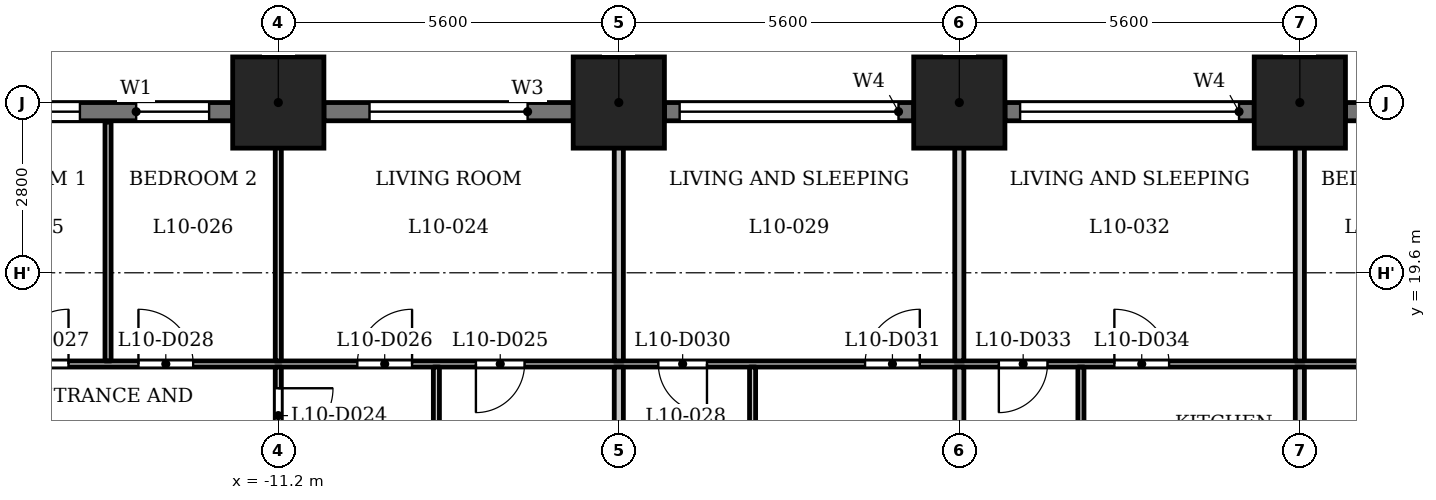
"""IFC4 building model, lengths in metres.
Left out: names, types, materials, properties, quantities, classifications, styles, units other than length and angle.
Written with IfcOpenShell. Run it as: python <this file> out.ifc"""

import sys

from ifc_helpers import new_model, si_unit, direction, frame, frame_2d, origin, origin_2d, place, context, subcontext, project, spatial, rectangle, extrude, element, fill, save


model = new_model("IFC4")
c1 = context("Model", 3, precision=1e-05, world=origin(), true_north=direction((0.0, 1.0)))
c2 = subcontext(c1, "Body", "Model", "MODEL_VIEW")
j1 = project(units=[si_unit("LENGTHUNIT", "METRE"), si_unit("PLANEANGLEUNIT", "RADIAN")], contexts=[c1])
p1 = place(None, origin())
s1 = spatial("IfcSite", under=j1, at=p1, CompositionType="ELEMENT")
p2 = place(p1, origin())
s2 = spatial("IfcBuilding", under=s1, at=p2, CompositionType="ELEMENT")
p3 = place(p2, frame((0.0, 0.0, 44.5)))
s3 = spatial("IfcBuildingStorey", under=s2, at=p3, CompositionType="ELEMENT", Elevation=44.5)
for number, where, z_axis, x_axis in (
    (1, (5.6, 22.4, 0.0), (0.0, 0.0, 1.0), (1.0, 0.0, 0.0)),
    (2, (0.0, 22.4, 0.0), (0.0, 0.0, 1.0), (1.0, 0.0, 0.0)),
    (3, (-5.6, 22.4, 0.0), (0.0, 0.0, 1.0), (1.0, 0.0, 0.0)),
    (4, (-11.2, 22.4, 0.0), (0.0, 0.0, 1.0), (1.0, 0.0, 0.0)),
):
    element("IfcColumn", number, at=place(p3, frame(where, z_axis=z_axis, x_axis=x_axis)), inside=s3, PredefinedType="COLUMN", context=c2, shape_type="SweptSolid", body=[
        extrude(rectangle(XDim=1.5, YDim=1.5, at=origin_2d()), origin(), (0.0, 0.0, 1.0), 3.5),
    ])
p4 = place(p3, frame((10.45, 22.25, 0.0), z_axis=(0.0, 0.0, 1.0), x_axis=(-1.0, 0.0, 0.0)))
e5 = element("IfcWall", 5, at=p4, inside=s3, PredefinedType="SOLIDWALL", context=c2, shape_type="SweptSolid", body=[
    extrude(rectangle(XDim=4.1, YDim=0.3, at=frame_2d((2.05, 0.0))), origin(), (0.0, 0.0, 1.0), 2.35),
])
p5 = place(p4, frame((0.387, 0.0, 0.6)))
e6 = element("IfcOpeningElement", 6, at=p5, cuts=e5, PredefinedType="OPENING", context=c2, shape_type="SweptSolid", body=[
    extrude(rectangle(XDim=1.2, YDim=1.55, at=frame_2d((0.6, 0.775))), frame((0.0, 0.16, 0.0), z_axis=(0.0, -1.0, 0.0), x_axis=(1.0, 0.0, 0.0)), (0.0, 0.0, 1.0), 0.32),
])
p6 = place(p4, frame((2.512, 0.0, 0.6)))
e7 = element("IfcOpeningElement", 7, at=p6, cuts=e5, PredefinedType="OPENING", context=c2, shape_type="SweptSolid", body=[
    extrude(rectangle(XDim=1.2, YDim=1.55, at=frame_2d((0.6, 0.775))), frame((0.0, 0.16, 0.0), z_axis=(0.0, -1.0, 0.0), x_axis=(1.0, 0.0, 0.0)), (0.0, 0.0, 1.0), 0.32),
])
p7 = place(p3, frame((4.85, 22.25, 0.0), z_axis=(0.0, 0.0, 1.0), x_axis=(-1.0, 0.0, 0.0)))
e8 = element("IfcWall", 8, at=p7, inside=s3, PredefinedType="SOLIDWALL", context=c2, shape_type="SweptSolid", body=[
    extrude(rectangle(XDim=4.1, YDim=0.3, at=frame_2d((2.05, 0.0))), origin(), (0.0, 0.0, 1.0), 2.35),
])
p8 = place(p7, frame((0.25, 0.0, 1.2)))
e9 = element("IfcOpeningElement", 9, at=p8, cuts=e8, PredefinedType="OPENING", context=c2, shape_type="SweptSolid", body=[
    extrude(rectangle(XDim=3.6, YDim=0.95, at=frame_2d((1.8, 0.475))), frame((0.0, 0.16, 0.0), z_axis=(0.0, -1.0, 0.0), x_axis=(1.0, 0.0, 0.0)), (0.0, 0.0, 1.0), 0.32),
])
p9 = place(p3, frame((-0.75, 22.25, 0.0), z_axis=(0.0, 0.0, 1.0), x_axis=(-1.0, 0.0, 0.0)))
e10 = element("IfcWall", 10, at=p9, inside=s3, PredefinedType="SOLIDWALL", context=c2, shape_type="SweptSolid", body=[
    extrude(rectangle(XDim=4.1, YDim=0.3, at=frame_2d((2.05, 0.0))), origin(), (0.0, 0.0, 1.0), 2.35),
])
p10 = place(p9, frame((0.25, 0.0, 1.2)))
e11 = element("IfcOpeningElement", 11, at=p10, cuts=e10, PredefinedType="OPENING", context=c2, shape_type="SweptSolid", body=[
    extrude(rectangle(XDim=3.6, YDim=0.95, at=frame_2d((1.8, 0.475))), frame((0.0, 0.16, 0.0), z_axis=(0.0, -1.0, 0.0), x_axis=(1.0, 0.0, 0.0)), (0.0, 0.0, 1.0), 0.32),
])
p11 = place(p3, frame((-6.35, 22.25, 0.0), z_axis=(0.0, 0.0, 1.0), x_axis=(-1.0, 0.0, 0.0)))
e12 = element("IfcWall", 12, at=p11, inside=s3, PredefinedType="SOLIDWALL", context=c2, shape_type="SweptSolid", body=[
    extrude(rectangle(XDim=4.1, YDim=0.3, at=frame_2d((2.05, 0.0))), origin(), (0.0, 0.0, 1.0), 2.35),
])
p12 = place(p11, frame((0.75, 0.0, 0.9)))
e13 = element("IfcOpeningElement", 13, at=p12, cuts=e12, PredefinedType="OPENING", context=c2, shape_type="SweptSolid", body=[
    extrude(rectangle(XDim=2.6, YDim=1.25, at=frame_2d((1.3, 0.625))), frame((0.0, 0.16, 0.0), z_axis=(0.0, -1.0, 0.0), x_axis=(1.0, 0.0, 0.0)), (0.0, 0.0, 1.0), 0.32),
])
p13 = place(p3, frame((-11.95, 22.25, 0.0), z_axis=(0.0, 0.0, 1.0), x_axis=(-1.0, 0.0, 0.0)))
e14 = element("IfcWall", 14, at=p13, inside=s3, PredefinedType="SOLIDWALL", context=c2, shape_type="SweptSolid", body=[
    extrude(rectangle(XDim=4.1, YDim=0.3, at=frame_2d((2.05, 0.0))), origin(), (0.0, 0.0, 1.0), 2.35),
])
p14 = place(p13, frame((0.387, 0.0, 0.6)))
e15 = element("IfcOpeningElement", 15, at=p14, cuts=e14, PredefinedType="OPENING", context=c2, shape_type="SweptSolid", body=[
    extrude(rectangle(XDim=1.2, YDim=1.55, at=frame_2d((0.6, 0.775))), frame((0.0, 0.16, 0.0), z_axis=(0.0, -1.0, 0.0), x_axis=(1.0, 0.0, 0.0)), (0.0, 0.0, 1.0), 0.32),
])
p15 = place(p13, frame((2.512, 0.0, 0.6)))
e16 = element("IfcOpeningElement", 16, at=p15, cuts=e14, PredefinedType="OPENING", context=c2, shape_type="SweptSolid", body=[
    extrude(rectangle(XDim=1.2, YDim=1.55, at=frame_2d((0.6, 0.775))), frame((0.0, 0.16, 0.0), z_axis=(0.0, -1.0, 0.0), x_axis=(1.0, 0.0, 0.0)), (0.0, 0.0, 1.0), 0.32),
])
p16 = place(p3, frame((-26.44, 18.1, 0.0), z_axis=(0.0, 0.0, 1.0), x_axis=(1.0, 0.0, 0.0)))
e17 = element("IfcWall", 17, at=p16, inside=s3, PredefinedType="PARTITIONING", context=c2, shape_type="SweptSolid", body=[
    extrude(rectangle(XDim=52.63, YDim=0.1, at=frame_2d((26.315, 0.0))), origin(), (0.0, 0.0, 1.0), 3.2),
])
p17 = place(p16, frame((2.626, 0.0, 0.0)))
e18 = element("IfcOpeningElement", 18, at=p17, cuts=e17, PredefinedType="OPENING", context=c2, shape_type="SweptSolid", body=[
    extrude(rectangle(XDim=0.8, YDim=2.1, at=frame_2d((0.4, 1.05))), frame((0.0, 0.06, 0.0), z_axis=(0.0, -1.0, 0.0), x_axis=(1.0, 0.0, 0.0)), (0.0, 0.0, 1.0), 0.12),
])
p18 = place(p16, frame((7.84, 0.0, 0.0)))
e19 = element("IfcOpeningElement", 19, at=p18, cuts=e17, PredefinedType="OPENING", context=c2, shape_type="SweptSolid", body=[
    extrude(rectangle(XDim=0.9, YDim=2.1, at=frame_2d((0.45, 1.05))), frame((0.0, 0.06, 0.0), z_axis=(0.0, -1.0, 0.0), x_axis=(1.0, 0.0, 0.0)), (0.0, 0.0, 1.0), 0.12),
])
p19 = place(p16, frame((18.49, 0.0, 0.0)))
e20 = element("IfcOpeningElement", 20, at=p19, cuts=e17, PredefinedType="OPENING", context=c2, shape_type="SweptSolid", body=[
    extrude(rectangle(XDim=0.8, YDim=2.1, at=frame_2d((0.4, 1.05))), frame((0.0, 0.06, 0.0), z_axis=(0.0, -1.0, 0.0), x_axis=(1.0, 0.0, 0.0)), (0.0, 0.0, 1.0), 0.12),
])
p20 = place(p16, frame((16.54, 0.0, 0.0)))
e21 = element("IfcOpeningElement", 21, at=p20, cuts=e17, PredefinedType="OPENING", context=c2, shape_type="SweptSolid", body=[
    extrude(rectangle(XDim=0.9, YDim=2.1, at=frame_2d((0.45, 1.05))), frame((0.0, 0.06, 0.0), z_axis=(0.0, -1.0, 0.0), x_axis=(1.0, 0.0, 0.0)), (0.0, 0.0, 1.0), 0.12),
])
p21 = place(p16, frame((10.89, 0.0, 0.0)))
e22 = element("IfcOpeningElement", 22, at=p21, cuts=e17, PredefinedType="OPENING", context=c2, shape_type="SweptSolid", body=[
    extrude(rectangle(XDim=0.9, YDim=2.1, at=frame_2d((0.45, 1.05))), frame((0.0, 0.06, 0.0), z_axis=(0.0, -1.0, 0.0), x_axis=(1.0, 0.0, 0.0)), (0.0, 0.0, 1.0), 0.12),
])
p22 = place(p16, frame((12.94, 0.0, 0.0)))
e23 = element("IfcOpeningElement", 23, at=p22, cuts=e17, PredefinedType="OPENING", context=c2, shape_type="SweptSolid", body=[
    extrude(rectangle(XDim=0.9, YDim=2.1, at=frame_2d((0.45, 1.05))), frame((0.0, 0.06, 0.0), z_axis=(0.0, -1.0, 0.0), x_axis=(1.0, 0.0, 0.0)), (0.0, 0.0, 1.0), 0.12),
])
p23 = place(p16, frame((21.49, 0.0, 0.0)))
e24 = element("IfcOpeningElement", 24, at=p23, cuts=e17, PredefinedType="OPENING", context=c2, shape_type="SweptSolid", body=[
    extrude(rectangle(XDim=0.8, YDim=2.1, at=frame_2d((0.4, 1.05))), frame((0.0, 0.06, 0.0), z_axis=(0.0, -1.0, 0.0), x_axis=(1.0, 0.0, 0.0)), (0.0, 0.0, 1.0), 0.12),
])
p24 = place(p16, frame((24.89, 0.0, 0.0)))
e25 = element("IfcOpeningElement", 25, at=p24, cuts=e17, PredefinedType="OPENING", context=c2, shape_type="SweptSolid", body=[
    extrude(rectangle(XDim=0.9, YDim=2.1, at=frame_2d((0.45, 1.05))), frame((0.0, 0.06, 0.0), z_axis=(0.0, -1.0, 0.0), x_axis=(1.0, 0.0, 0.0)), (0.0, 0.0, 1.0), 0.12),
])
p25 = place(p16, frame((27.09, 0.0, 0.0)))
e26 = element("IfcOpeningElement", 26, at=p25, cuts=e17, PredefinedType="OPENING", context=c2, shape_type="SweptSolid", body=[
    extrude(rectangle(XDim=0.8, YDim=2.1, at=frame_2d((0.4, 1.05))), frame((0.0, 0.06, 0.0), z_axis=(0.0, -1.0, 0.0), x_axis=(1.0, 0.0, 0.0)), (0.0, 0.0, 1.0), 0.12),
])
p26 = place(p16, frame((28.99, 0.0, 0.0)))
e27 = element("IfcOpeningElement", 27, at=p26, cuts=e17, PredefinedType="OPENING", context=c2, shape_type="SweptSolid", body=[
    extrude(rectangle(XDim=0.9, YDim=2.1, at=frame_2d((0.45, 1.05))), frame((0.0, 0.06, 0.0), z_axis=(0.0, -1.0, 0.0), x_axis=(1.0, 0.0, 0.0)), (0.0, 0.0, 1.0), 0.12),
])
p27 = place(p16, frame((41.69, 0.0, 0.0)))
e28 = element("IfcOpeningElement", 28, at=p27, cuts=e17, PredefinedType="OPENING", context=c2, shape_type="SweptSolid", body=[
    extrude(rectangle(XDim=0.8, YDim=2.1, at=frame_2d((0.4, 1.05))), frame((0.0, 0.06, 0.0), z_axis=(0.0, -1.0, 0.0), x_axis=(1.0, 0.0, 0.0)), (0.0, 0.0, 1.0), 0.12),
])
p28 = place(p16, frame((38.99, 0.0, 0.0)))
e29 = element("IfcOpeningElement", 29, at=p28, cuts=e17, PredefinedType="OPENING", context=c2, shape_type="SweptSolid", body=[
    extrude(rectangle(XDim=0.9, YDim=2.1, at=frame_2d((0.45, 1.05))), frame((0.0, 0.06, 0.0), z_axis=(0.0, -1.0, 0.0), x_axis=(1.0, 0.0, 0.0)), (0.0, 0.0, 1.0), 0.12),
])
p29 = place(p16, frame((33.29, 0.0, 0.0)))
e30 = element("IfcOpeningElement", 30, at=p29, cuts=e17, PredefinedType="OPENING", context=c2, shape_type="SweptSolid", body=[
    extrude(rectangle(XDim=0.9, YDim=2.1, at=frame_2d((0.45, 1.05))), frame((0.0, 0.06, 0.0), z_axis=(0.0, -1.0, 0.0), x_axis=(1.0, 0.0, 0.0)), (0.0, 0.0, 1.0), 0.12),
])
p30 = place(p16, frame((35.34, 0.0, 0.0)))
e31 = element("IfcOpeningElement", 31, at=p30, cuts=e17, PredefinedType="OPENING", context=c2, shape_type="SweptSolid", body=[
    extrude(rectangle(XDim=0.9, YDim=2.1, at=frame_2d((0.45, 1.05))), frame((0.0, 0.06, 0.0), z_axis=(0.0, -1.0, 0.0), x_axis=(1.0, 0.0, 0.0)), (0.0, 0.0, 1.0), 0.12),
])
p31 = place(p16, frame((50.74, 0.0, 0.0)))
e32 = element("IfcOpeningElement", 32, at=p31, cuts=e17, PredefinedType="OPENING", context=c2, shape_type="SweptSolid", body=[
    extrude(rectangle(XDim=0.8, YDim=2.1, at=frame_2d((0.4, 1.05))), frame((0.0, 0.06, 0.0), z_axis=(0.0, -1.0, 0.0), x_axis=(1.0, 0.0, 0.0)), (0.0, 0.0, 1.0), 0.12),
])
p32 = place(p16, frame((47.29, 0.0, 0.0)))
e33 = element("IfcOpeningElement", 33, at=p32, cuts=e17, PredefinedType="OPENING", context=c2, shape_type="SweptSolid", body=[
    extrude(rectangle(XDim=0.9, YDim=2.1, at=frame_2d((0.45, 1.05))), frame((0.0, 0.06, 0.0), z_axis=(0.0, -1.0, 0.0), x_axis=(1.0, 0.0, 0.0)), (0.0, 0.0, 1.0), 0.12),
])
p33 = place(p3, frame((-14.0, 18.15, 0.0), z_axis=(0.0, 0.0, 1.0), x_axis=(0.0, 1.0, 0.0)))
e34 = element("IfcWall", 34, at=p33, inside=s3, PredefinedType="PARTITIONING", context=c2, shape_type="SweptSolid", body=[
    extrude(rectangle(XDim=3.93, YDim=0.1, at=frame_2d((1.965, 0.0))), origin(), (0.0, 0.0, 1.0), 3.2),
])
p34 = place(p3, frame((-11.2, 15.475, 0.0), z_axis=(0.0, 0.0, 1.0), x_axis=(0.0, 1.0, 0.0)))
e35 = element("IfcWall", 35, at=p34, inside=s3, PredefinedType="PARTITIONING", context=c2, shape_type="SweptSolid", body=[
    extrude(rectangle(XDim=2.575, YDim=0.1, at=frame_2d((1.288, 0.0))), origin(), (0.0, 0.0, 1.0), 3.2),
])
p35 = place(p34, frame((1.326, 0.0, 0.0)))
e36 = element("IfcOpeningElement", 36, at=p35, cuts=e35, PredefinedType="OPENING", context=c2, shape_type="SweptSolid", body=[
    extrude(rectangle(XDim=0.9, YDim=2.1, at=frame_2d((0.45, 1.05))), frame((0.0, 0.06, 0.0), z_axis=(0.0, -1.0, 0.0), x_axis=(1.0, 0.0, 0.0)), (0.0, 0.0, 1.0), 0.12),
])
p36 = place(p3, frame((-11.2, 18.15, 0.0), z_axis=(0.0, 0.0, 1.0), x_axis=(0.0, 1.0, 0.0)))
e37 = element("IfcWall", 37, at=p36, inside=s3, PredefinedType="PARTITIONING", context=c2, shape_type="SweptSolid", body=[
    extrude(rectangle(XDim=4.98, YDim=0.1, at=frame_2d((2.49, 0.0))), origin(), (0.0, 0.0, 1.0), 3.2),
])
p37 = place(p3, frame((-8.6, 15.475, 0.0), z_axis=(0.0, 0.0, 1.0), x_axis=(0.0, 1.0, 0.0)))
e38 = element("IfcWall", 38, at=p37, inside=s3, PredefinedType="PARTITIONING", context=c2, shape_type="SweptSolid", body=[
    extrude(rectangle(XDim=2.575, YDim=0.1, at=frame_2d((1.288, 0.0))), origin(), (0.0, 0.0, 1.0), 3.2),
])
p38 = place(p3, frame((-5.6, 15.475, 0.0), z_axis=(0.0, 0.0, 1.0), x_axis=(0.0, 1.0, 0.0)))
e39 = element("IfcWall", 39, at=p38, inside=s3, PredefinedType="PARTITIONING", context=c2, shape_type="SweptSolid", body=[
    extrude(rectangle(XDim=2.575, YDim=0.15, at=frame_2d((1.288, 0.0))), origin(), (0.0, 0.0, 1.0), 3.2),
])
p39 = place(p3, frame((-5.6, 18.15, 0.0), z_axis=(0.0, 0.0, 1.0), x_axis=(0.0, 1.0, 0.0)))
e40 = element("IfcWall", 40, at=p39, inside=s3, PredefinedType="PARTITIONING", context=c2, shape_type="SweptSolid", body=[
    extrude(rectangle(XDim=4.98, YDim=0.15, at=frame_2d((2.49, 0.0))), origin(), (0.0, 0.0, 1.0), 3.2),
])
p40 = place(p3, frame((-3.4, 15.475, 0.0), z_axis=(0.0, 0.0, 1.0), x_axis=(0.0, 1.0, 0.0)))
e41 = element("IfcWall", 41, at=p40, inside=s3, PredefinedType="PARTITIONING", context=c2, shape_type="SweptSolid", body=[
    extrude(rectangle(XDim=2.575, YDim=0.1, at=frame_2d((1.288, 0.0))), origin(), (0.0, 0.0, 1.0), 3.2),
])
p41 = place(p3, frame((0.0, 15.475, 0.0), z_axis=(0.0, 0.0, 1.0), x_axis=(0.0, 1.0, 0.0)))
e42 = element("IfcWall", 42, at=p41, inside=s3, PredefinedType="PARTITIONING", context=c2, shape_type="SweptSolid", body=[
    extrude(rectangle(XDim=2.575, YDim=0.15, at=frame_2d((1.288, 0.0))), origin(), (0.0, 0.0, 1.0), 3.2),
])
p42 = place(p3, frame((0.0, 18.15, 0.0), z_axis=(0.0, 0.0, 1.0), x_axis=(0.0, 1.0, 0.0)))
e43 = element("IfcWall", 43, at=p42, inside=s3, PredefinedType="PARTITIONING", context=c2, shape_type="SweptSolid", body=[
    extrude(rectangle(XDim=4.98, YDim=0.15, at=frame_2d((2.49, 0.0))), origin(), (0.0, 0.0, 1.0), 3.2),
])
p43 = place(p3, frame((2.0, 15.475, 0.0), z_axis=(0.0, 0.0, 1.0), x_axis=(0.0, 1.0, 0.0)))
e44 = element("IfcWall", 44, at=p43, inside=s3, PredefinedType="PARTITIONING", context=c2, shape_type="SweptSolid", body=[
    extrude(rectangle(XDim=2.575, YDim=0.1, at=frame_2d((1.288, 0.0))), origin(), (0.0, 0.0, 1.0), 3.2),
])
p44 = place(p3, frame((5.6, 15.475, 0.0), z_axis=(0.0, 0.0, 1.0), x_axis=(0.0, 1.0, 0.0)))
e45 = element("IfcWall", 45, at=p44, inside=s3, PredefinedType="PARTITIONING", context=c2, shape_type="SweptSolid", body=[
    extrude(rectangle(XDim=2.575, YDim=0.15, at=frame_2d((1.288, 0.0))), origin(), (0.0, 0.0, 1.0), 3.2),
])
p45 = place(p3, frame((5.6, 18.15, 0.0), z_axis=(0.0, 0.0, 1.0), x_axis=(0.0, 1.0, 0.0)))
e46 = element("IfcWall", 46, at=p45, inside=s3, PredefinedType="PARTITIONING", context=c2, shape_type="SweptSolid", body=[
    extrude(rectangle(XDim=4.98, YDim=0.15, at=frame_2d((2.49, 0.0))), origin(), (0.0, 0.0, 1.0), 3.2),
])
p46 = place(p35, origin())
e47 = element("IfcDoor", 47, at=p46, inside=s3, OperationType="SINGLE_SWING_RIGHT", PredefinedType="DOOR", context=c2, shape_type="SweptSolid", body=[
    extrude(rectangle(XDim=0.9, YDim=2.1, at=frame_2d((0.45, 1.05))), frame((0.0, 0.025, 0.0), z_axis=(0.0, -1.0, 0.0), x_axis=(1.0, 0.0, 0.0)), (0.0, 0.0, 1.0), 0.05),
])
fill(e36, e47)
p47 = place(p19, origin())
e48 = element("IfcDoor", 48, at=p47, inside=s3, OperationType="SINGLE_SWING_LEFT", PredefinedType="DOOR", context=c2, shape_type="SweptSolid", body=[
    extrude(rectangle(XDim=0.8, YDim=2.1, at=frame_2d((0.4, 1.05))), frame((0.0, 0.025, 0.0), z_axis=(0.0, -1.0, 0.0), x_axis=(1.0, 0.0, 0.0)), (0.0, 0.0, 1.0), 0.05),
])
fill(e20, e48)
p48 = place(p20, origin())
e49 = element("IfcDoor", 49, at=p48, inside=s3, OperationType="SINGLE_SWING_LEFT", PredefinedType="DOOR", context=c2, shape_type="SweptSolid", body=[
    extrude(rectangle(XDim=0.9, YDim=2.1, at=frame_2d((0.45, 1.05))), frame((0.0, 0.025, 0.0), z_axis=(0.0, -1.0, 0.0), x_axis=(1.0, 0.0, 0.0)), (0.0, 0.0, 1.0), 0.05),
])
fill(e21, e49)
p49 = place(p21, origin())
e50 = element("IfcDoor", 50, at=p49, inside=s3, OperationType="SINGLE_SWING_LEFT", PredefinedType="DOOR", context=c2, shape_type="SweptSolid", body=[
    extrude(rectangle(XDim=0.9, YDim=2.1, at=frame_2d((0.45, 1.05))), frame((0.0, 0.025, 0.0), z_axis=(0.0, -1.0, 0.0), x_axis=(1.0, 0.0, 0.0)), (0.0, 0.0, 1.0), 0.05),
])
fill(e22, e50)
p50 = place(p22, origin())
e51 = element("IfcDoor", 51, at=p50, inside=s3, OperationType="SINGLE_SWING_RIGHT", PredefinedType="DOOR", context=c2, shape_type="SweptSolid", body=[
    extrude(rectangle(XDim=0.9, YDim=2.1, at=frame_2d((0.45, 1.05))), frame((0.0, 0.025, 0.0), z_axis=(0.0, -1.0, 0.0), x_axis=(1.0, 0.0, 0.0)), (0.0, 0.0, 1.0), 0.05),
])
fill(e23, e51)
p51 = place(p23, origin())
e52 = element("IfcDoor", 52, at=p51, inside=s3, OperationType="SINGLE_SWING_RIGHT", PredefinedType="DOOR", context=c2, shape_type="SweptSolid", body=[
    extrude(rectangle(XDim=0.8, YDim=2.1, at=frame_2d((0.4, 1.05))), frame((0.0, 0.025, 0.0), z_axis=(0.0, -1.0, 0.0), x_axis=(1.0, 0.0, 0.0)), (0.0, 0.0, 1.0), 0.05),
])
fill(e24, e52)
p52 = place(p24, origin())
e53 = element("IfcDoor", 53, at=p52, inside=s3, OperationType="SINGLE_SWING_LEFT", PredefinedType="DOOR", context=c2, shape_type="SweptSolid", body=[
    extrude(rectangle(XDim=0.9, YDim=2.1, at=frame_2d((0.45, 1.05))), frame((0.0, 0.025, 0.0), z_axis=(0.0, -1.0, 0.0), x_axis=(1.0, 0.0, 0.0)), (0.0, 0.0, 1.0), 0.05),
])
fill(e25, e53)
p53 = place(p25, origin())
e54 = element("IfcDoor", 54, at=p53, inside=s3, OperationType="SINGLE_SWING_LEFT", PredefinedType="DOOR", context=c2, shape_type="SweptSolid", body=[
    extrude(rectangle(XDim=0.8, YDim=2.1, at=frame_2d((0.4, 1.05))), frame((0.0, 0.025, 0.0), z_axis=(0.0, -1.0, 0.0), x_axis=(1.0, 0.0, 0.0)), (0.0, 0.0, 1.0), 0.05),
])
fill(e26, e54)
p54 = place(p26, origin())
e55 = element("IfcDoor", 55, at=p54, inside=s3, OperationType="SINGLE_SWING_RIGHT", PredefinedType="DOOR", context=c2, shape_type="SweptSolid", body=[
    extrude(rectangle(XDim=0.9, YDim=2.1, at=frame_2d((0.45, 1.05))), frame((0.0, 0.025, 0.0), z_axis=(0.0, -1.0, 0.0), x_axis=(1.0, 0.0, 0.0)), (0.0, 0.0, 1.0), 0.05),
])
fill(e27, e55)
p55 = place(p8, origin())
e56 = element("IfcWindow", 56, at=p55, inside=s3, PartitioningType="SINGLE_PANEL", PredefinedType="WINDOW", context=c2, shape_type="SweptSolid", body=[
    extrude(rectangle(XDim=3.6, YDim=0.95, at=frame_2d((1.8, 0.475))), frame((0.0, 0.03, 0.0), z_axis=(0.0, -1.0, 0.0), x_axis=(1.0, 0.0, 0.0)), (0.0, 0.0, 1.0), 0.06),
])
fill(e9, e56)
p56 = place(p10, origin())
e57 = element("IfcWindow", 57, at=p56, inside=s3, PartitioningType="SINGLE_PANEL", PredefinedType="WINDOW", context=c2, shape_type="SweptSolid", body=[
    extrude(rectangle(XDim=3.6, YDim=0.95, at=frame_2d((1.8, 0.475))), frame((0.0, 0.03, 0.0), z_axis=(0.0, -1.0, 0.0), x_axis=(1.0, 0.0, 0.0)), (0.0, 0.0, 1.0), 0.06),
])
fill(e11, e57)
p57 = place(p12, origin())
e58 = element("IfcWindow", 58, at=p57, inside=s3, PartitioningType="SINGLE_PANEL", PredefinedType="WINDOW", context=c2, shape_type="SweptSolid", body=[
    extrude(rectangle(XDim=2.6, YDim=1.25, at=frame_2d((1.3, 0.625))), frame((0.0, 0.03, 0.0), z_axis=(0.0, -1.0, 0.0), x_axis=(1.0, 0.0, 0.0)), (0.0, 0.0, 1.0), 0.06),
])
fill(e13, e58)
p58 = place(p14, origin())
e59 = element("IfcWindow", 59, at=p58, inside=s3, PartitioningType="SINGLE_PANEL", PredefinedType="WINDOW", context=c2, shape_type="SweptSolid", body=[
    extrude(rectangle(XDim=1.2, YDim=1.55, at=frame_2d((0.6, 0.775))), frame((0.0, 0.03, 0.0), z_axis=(0.0, -1.0, 0.0), x_axis=(1.0, 0.0, 0.0)), (0.0, 0.0, 1.0), 0.06),
])
fill(e15, e59)
p59 = place(p15, origin())
e60 = element("IfcWindow", 60, at=p59, inside=s3, PartitioningType="SINGLE_PANEL", PredefinedType="WINDOW", context=c2, shape_type="SweptSolid", body=[
    extrude(rectangle(XDim=1.2, YDim=1.55, at=frame_2d((0.6, 0.775))), frame((0.0, 0.03, 0.0), z_axis=(0.0, -1.0, 0.0), x_axis=(1.0, 0.0, 0.0)), (0.0, 0.0, 1.0), 0.06),
])
fill(e16, e60)
save(model, sys.argv[1])
